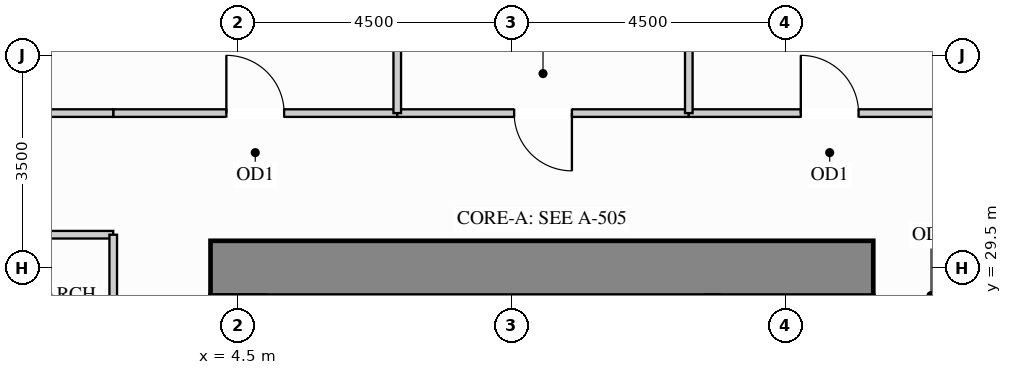
"""IFC4 building model, lengths in metres.
Left out: names, types, materials, properties, quantities, classifications, styles, units other than length and angle.
Written with IfcOpenShell. Run it as: python <this file> out.ifc"""

import sys

from ifc_helpers import new_model, si_unit, direction, frame, frame_2d, origin, place, context, subcontext, project, spatial, rectangle, extrude, source, transform, mapped, element, fill, save


model = new_model("IFC4")
c1 = context("Model", 3, precision=1e-05, world=origin(), true_north=direction((0.0, 1.0)))
c2 = subcontext(c1, "Body", "Model", "MODEL_VIEW")
j1 = project(units=[si_unit("LENGTHUNIT", "METRE"), si_unit("PLANEANGLEUNIT", "RADIAN")], contexts=[c1])
p1 = place(None, origin())
s1 = spatial("IfcSite", under=j1, at=p1, CompositionType="ELEMENT")
p2 = place(p1, origin())
s2 = spatial("IfcBuilding", under=s1, at=p2, CompositionType="ELEMENT")
p3 = place(p2, frame((0.0, 0.0, 36.9)))
s3 = spatial("IfcBuildingStorey", under=s2, at=p3, CompositionType="ELEMENT", Elevation=36.9)
m1 = source(origin(), c2, "Body", "SweptSolid", [
    extrude(rectangle(XDim=10.9, YDim=0.9, at=frame_2d((5.45, 0.0))), origin(), (0.0, 0.0, 1.0), 3.38),
])
p4 = place(p3, frame((4.05, 29.5, 0.0), z_axis=(0.0, 0.0, 1.0), x_axis=(1.0, 0.0, 0.0)))
e1 = element("IfcWall", 1, at=p4, inside=s3, PredefinedType="SHEAR", context=c2, shape_type="MappedRepresentation", body=[
    mapped(m1, transform((0.0, 0.0, 0.0), x_axis=(1.0, 0.0, 0.0), y_axis=(0.0, 1.0, 0.0), z_axis=(0.0, 0.0, 1.0))),
])
p5 = place(p3, frame((2.45, 32.05, 0.0), z_axis=(0.0, 0.0, 1.0), x_axis=(1.0, 0.0, 0.0)))
e2 = element("IfcWall", 2, at=p5, inside=s3, PredefinedType="PARTITIONING", context=c2, shape_type="SweptSolid", body=[
    extrude(rectangle(XDim=4.671, YDim=0.125, at=frame_2d((2.335, 0.0))), origin(), (0.0, 0.0, 1.0), 3.365),
])
p6 = place(p5, frame((1.861, 0.0, 0.0)))
e3 = element("IfcOpeningElement", 3, at=p6, cuts=e2, PredefinedType="OPENING", context=c2, shape_type="SweptSolid", body=[
    extrude(rectangle(XDim=0.95, YDim=2.15, at=frame_2d((0.475, 1.075))), frame((0.0, 0.073, 0.0), z_axis=(0.0, -1.0, 0.0), x_axis=(1.0, 0.0, 0.0)), (0.0, 0.0, 1.0), 0.145),
])
p7 = place(p3, frame((7.121, 32.05, 0.0), z_axis=(0.0, 0.0, 1.0), x_axis=(1.0, 0.0, 0.0)))
e4 = element("IfcWall", 4, at=p7, inside=s3, PredefinedType="PARTITIONING", context=c2, shape_type="SweptSolid", body=[
    extrude(rectangle(XDim=4.795, YDim=0.125, at=frame_2d((2.397, 0.0))), origin(), (0.0, 0.0, 1.0), 3.365),
])
p8 = place(p7, frame((1.923, 0.0, 0.0)))
e5 = element("IfcOpeningElement", 5, at=p8, cuts=e4, PredefinedType="OPENING", context=c2, shape_type="SweptSolid", body=[
    extrude(rectangle(XDim=0.95, YDim=2.15, at=frame_2d((0.475, 1.075))), frame((0.0, 0.073, 0.0), z_axis=(0.0, -1.0, 0.0), x_axis=(1.0, 0.0, 0.0)), (0.0, 0.0, 1.0), 0.145),
])
p9 = place(p3, frame((11.916, 32.05, 0.0), z_axis=(0.0, 0.0, 1.0), x_axis=(1.0, 0.0, 0.0)))
e6 = element("IfcWall", 6, at=p9, inside=s3, PredefinedType="PARTITIONING", context=c2, shape_type="SweptSolid", body=[
    extrude(rectangle(XDim=4.634, YDim=0.125, at=frame_2d((2.317, 0.0))), origin(), (0.0, 0.0, 1.0), 3.365),
])
p10 = place(p9, frame((1.842, 0.0, 0.0)))
e7 = element("IfcOpeningElement", 7, at=p10, cuts=e6, PredefinedType="OPENING", context=c2, shape_type="SweptSolid", body=[
    extrude(rectangle(XDim=0.95, YDim=2.15, at=frame_2d((0.475, 1.075))), frame((0.0, 0.073, 0.0), z_axis=(0.0, -1.0, 0.0), x_axis=(1.0, 0.0, 0.0)), (0.0, 0.0, 1.0), 0.145),
])
m2 = source(origin(), c2, "Body", "SweptSolid", [
    extrude(rectangle(XDim=2.098, YDim=0.125, at=frame_2d((1.049, 0.0))), origin(), (0.0, 0.0, 1.0), 3.365),
])
p11 = place(p3, frame((0.352, 32.05, 0.0), z_axis=(0.0, 0.0, 1.0), x_axis=(1.0, 0.0, 0.0)))
e8 = element("IfcWall", 8, at=p11, inside=s3, PredefinedType="PARTITIONING", context=c2, shape_type="MappedRepresentation", body=[
    mapped(m2, transform((0.0, 0.0, 0.0), x_axis=(1.0, 0.0, 0.0), y_axis=(0.0, 1.0, 0.0), z_axis=(0.0, 0.0, 1.0))),
])
m3 = source(origin(), c2, "Body", "SweptSolid", [
    extrude(rectangle(XDim=17.598, YDim=0.125, at=frame_2d((8.799, 0.0))), origin(), (0.0, 0.0, 1.0), 3.365),
])
for number, where, z_axis, x_axis in (
    (9, (7.121, 32.05, 0.0), (0.0, 0.0, 1.0), (0.0, 1.0, 0.0)),
    (10, (11.916, 32.05, 0.0), (0.0, 0.0, 1.0), (0.0, 1.0, 0.0)),
):
    element("IfcWall", number, at=place(p3, frame(where, z_axis=z_axis, x_axis=x_axis)), inside=s3, PredefinedType="PARTITIONING", context=c2, shape_type="MappedRepresentation", body=[
        mapped(m3, transform((0.0, 0.0, 0.0), x_axis=(1.0, 0.0, 0.0), y_axis=(0.0, 1.0, 0.0), z_axis=(0.0, 0.0, 1.0))),
    ])
m4 = source(origin(), c2, "Body", "SweptSolid", [
    extrude(rectangle(XDim=1.19, YDim=0.125, at=frame_2d((0.595, 0.0))), origin(), (0.0, 0.0, 1.0), 3.365),
])
p12 = place(p3, frame((1.26, 30.05, 0.0), z_axis=(0.0, 0.0, 1.0), x_axis=(1.0, 0.0, 0.0)))
e11 = element("IfcWall", 11, at=p12, inside=s3, PredefinedType="PARTITIONING", context=c2, shape_type="MappedRepresentation", body=[
    mapped(m4, transform((0.0, 0.0, 0.0), x_axis=(1.0, 0.0, 0.0), y_axis=(0.0, 1.0, 0.0), z_axis=(0.0, 0.0, 1.0))),
])
p13 = place(p3, frame((2.45, 22.6, 0.0), z_axis=(0.0, 0.0, 1.0), x_axis=(0.0, 1.0, 0.0)))
e12 = element("IfcWall", 12, at=p13, inside=s3, PredefinedType="PARTITIONING", context=c2, shape_type="SweptSolid", body=[
    extrude(rectangle(XDim=7.45, YDim=0.125, at=frame_2d((3.725, 0.0))), origin(), (0.0, 0.0, 1.0), 3.365),
])
p14 = place(p13, frame((2.227, 0.0, 0.0)))
e13 = element("IfcOpeningElement", 13, at=p14, cuts=e12, PredefinedType="OPENING", context=c2, shape_type="SweptSolid", body=[
    extrude(rectangle(XDim=0.95, YDim=2.15, at=frame_2d((0.475, 1.075))), frame((0.0, 0.073, 0.0), z_axis=(0.0, -1.0, 0.0), x_axis=(1.0, 0.0, 0.0)), (0.0, 0.0, 1.0), 0.145),
])
m5 = source(origin(), c2, "Body", "SweptSolid", [
    extrude(rectangle(XDim=0.95, YDim=2.15, at=frame_2d((0.475, 1.075))), frame((0.0, 0.025, 0.0), z_axis=(0.0, -1.0, 0.0), x_axis=(1.0, 0.0, 0.0)), (0.0, 0.0, 1.0), 0.05),
])
p15 = place(p6, origin())
e14 = element("IfcDoor", 14, at=p15, inside=s3, OperationType="SINGLE_SWING_LEFT", PredefinedType="DOOR", context=c2, shape_type="MappedRepresentation", body=[
    mapped(m5, transform((0.0, 0.0, 0.0), x_axis=(1.0, 0.0, 0.0), y_axis=(0.0, 1.0, 0.0), z_axis=(0.0, 0.0, 1.0))),
])
fill(e3, e14)
p16 = place(p8, origin())
e15 = element("IfcDoor", 15, at=p16, inside=s3, OperationType="SINGLE_SWING_RIGHT", PredefinedType="DOOR", context=c2, shape_type="MappedRepresentation", body=[
    mapped(m5, transform((0.0, 0.0, 0.0), x_axis=(1.0, 0.0, 0.0), y_axis=(0.0, 1.0, 0.0), z_axis=(0.0, 0.0, 1.0))),
])
fill(e5, e15)
p17 = place(p10, origin())
e16 = element("IfcDoor", 16, at=p17, inside=s3, OperationType="SINGLE_SWING_LEFT", PredefinedType="DOOR", context=c2, shape_type="MappedRepresentation", body=[
    mapped(m5, transform((0.0, 0.0, 0.0), x_axis=(1.0, 0.0, 0.0), y_axis=(0.0, 1.0, 0.0), z_axis=(0.0, 0.0, 1.0))),
])
fill(e7, e16)
save(model, sys.argv[1])
